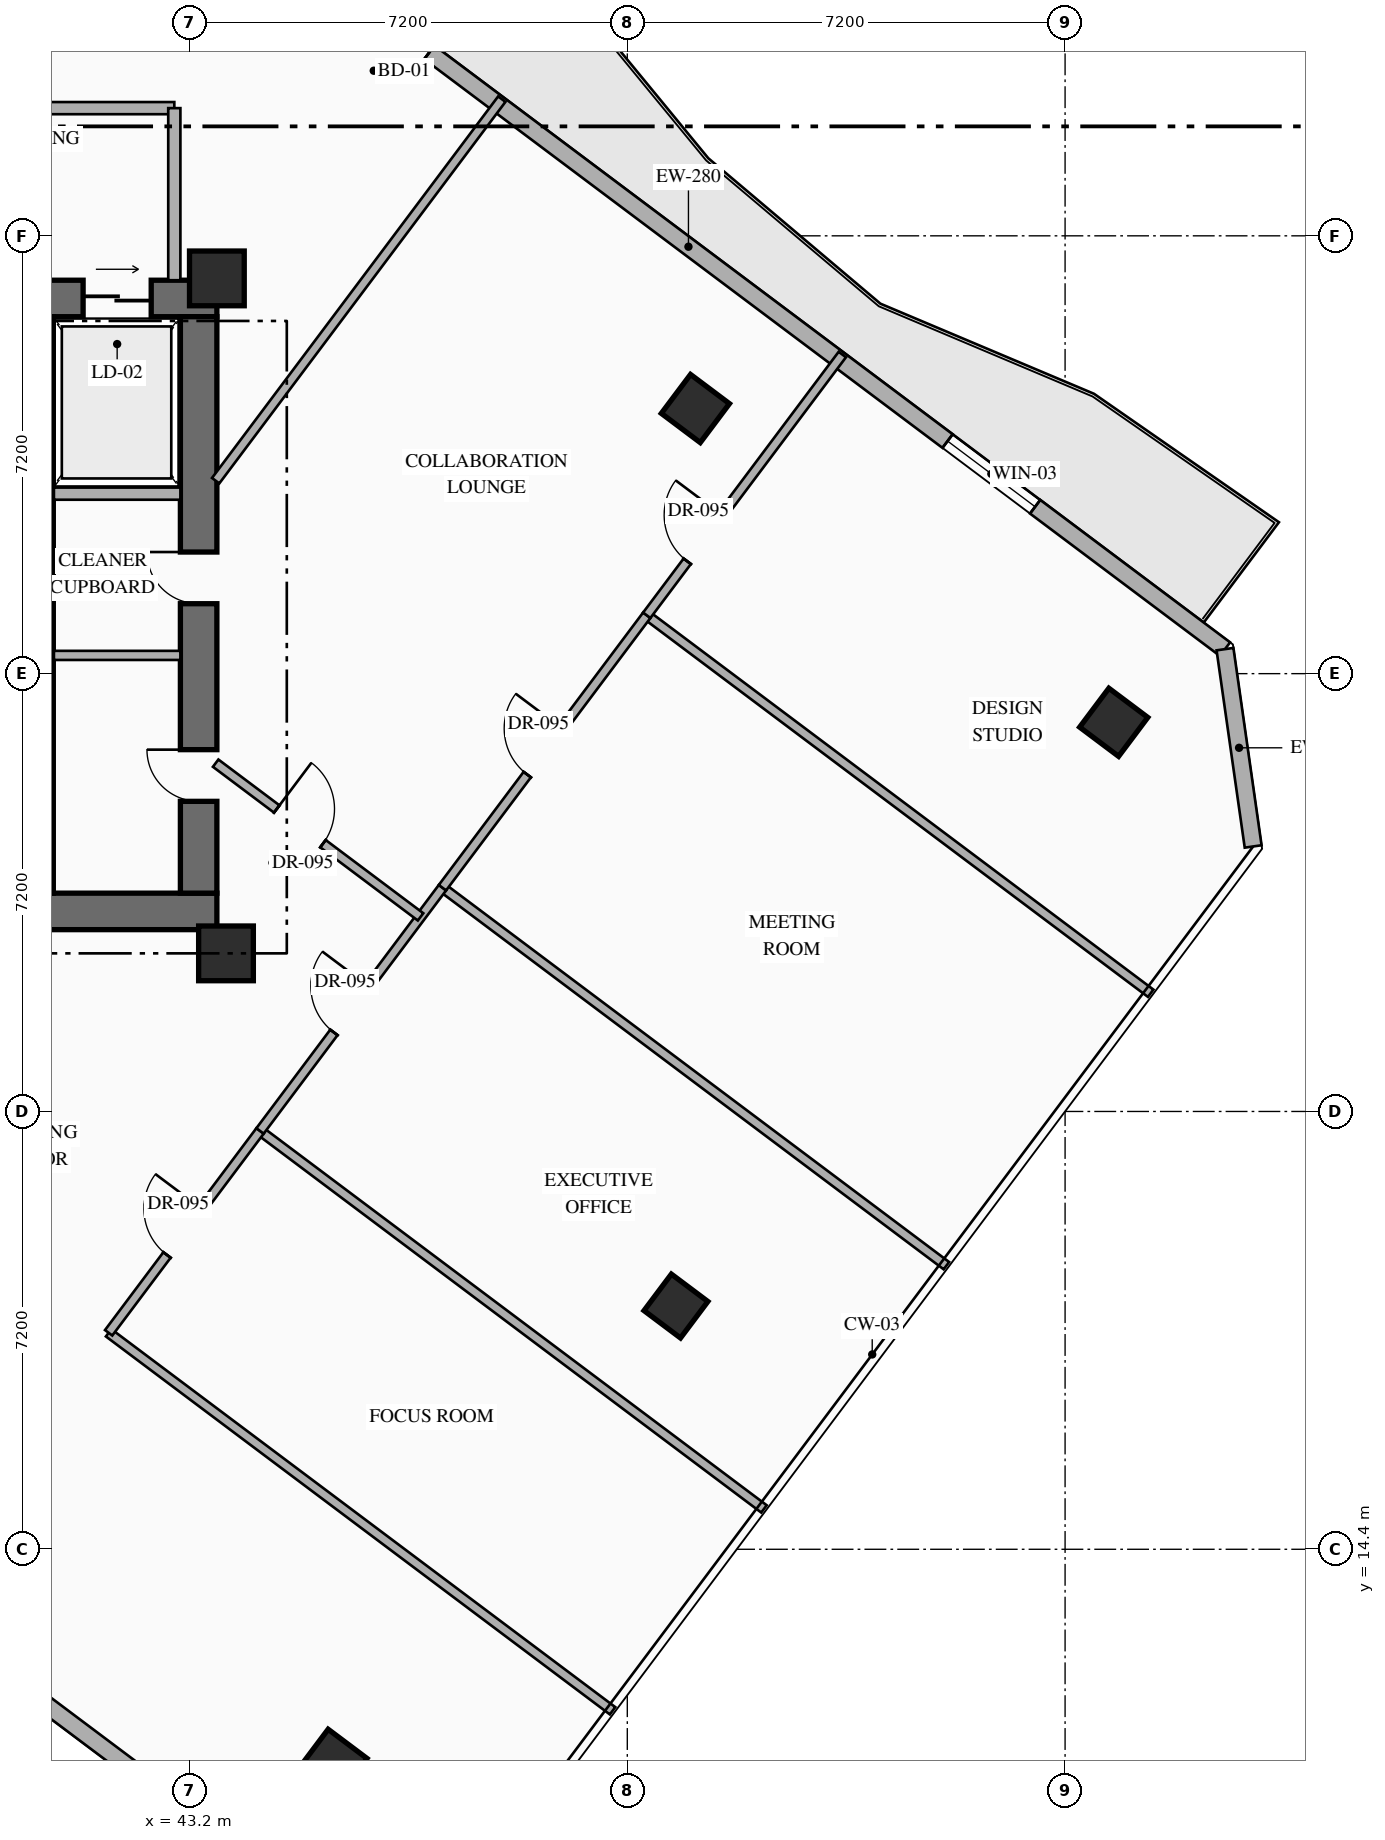
"""IFC4 building model, lengths in metres.
Left out: names, types, materials, properties, quantities, classifications, styles, units other than length and angle.
Written with IfcOpenShell. Run it as: python <this file> out.ifc"""

import sys

from ifc_helpers import new_model, si_unit, direction, frame, frame_2d, origin, origin_2d, place, context, subcontext, project, spatial, rectangle, hollow_rectangle, extrude, element, fill, save


model = new_model("IFC4")
c1 = context("Model", 3, precision=1e-05, world=origin(), true_north=direction((0.0, 1.0)))
c2 = subcontext(c1, "Body", "Model", "MODEL_VIEW")
j1 = project(units=[si_unit("LENGTHUNIT", "METRE"), si_unit("PLANEANGLEUNIT", "RADIAN")], contexts=[c1])
p1 = place(None, origin())
s1 = spatial("IfcSite", under=j1, at=p1, CompositionType="ELEMENT")
p2 = place(p1, origin())
s2 = spatial("IfcBuilding", under=s1, at=p2, CompositionType="ELEMENT")
p3 = place(p2, frame((0.0, 0.0, 163.65)))
s3 = spatial("IfcBuildingStorey", under=s2, at=p3, CompositionType="ELEMENT", Elevation=163.65)
p4 = place(p3, frame((35.89, 24.89, 0.0), z_axis=(0.0, 0.0, 1.0), x_axis=(1.0, 0.0, 0.0)))
e1 = element("IfcWall", 1, at=p4, inside=s3, PredefinedType="SHEAR", context=c2, shape_type="SweptSolid", body=[
    extrude(rectangle(XDim=7.76, YDim=0.6, at=frame_2d((3.88, 0.0))), origin(), (0.0, 0.0, 1.0), 3.6),
])
p5 = place(p3, frame((35.89, 34.97, 0.0), z_axis=(0.0, 0.0, 1.0), x_axis=(1.0, 0.0, 0.0)))
e2 = element("IfcWall", 2, at=p5, inside=s3, PredefinedType="SHEAR", context=c2, shape_type="SweptSolid", body=[
    extrude(rectangle(XDim=7.76, YDim=0.6, at=frame_2d((3.88, 0.0))), origin(), (0.0, 0.0, 1.0), 3.6),
])
p6 = place(p5, frame((2.66, 0.0, 0.0)))
e3 = element("IfcOpeningElement", 3, at=p6, cuts=e2, PredefinedType="OPENING", context=c2, shape_type="SweptSolid", body=[
    extrude(rectangle(XDim=1.1, YDim=2.2, at=frame_2d((0.55, 1.1))), frame((0.0, 0.31, 0.0), z_axis=(0.0, -1.0, 0.0), x_axis=(1.0, 0.0, 0.0)), (0.0, 0.0, 1.0), 0.62),
])
p7 = place(p5, frame((5.56, 0.0, 0.0)))
e4 = element("IfcOpeningElement", 4, at=p7, cuts=e2, PredefinedType="OPENING", context=c2, shape_type="SweptSolid", body=[
    extrude(rectangle(XDim=1.12, YDim=2.15, at=frame_2d((0.56, 1.075))), frame((0.0, 0.31, 0.0), z_axis=(0.0, -1.0, 0.0), x_axis=(1.0, 0.0, 0.0)), (0.0, 0.0, 1.0), 0.62),
])
p8 = place(p3, frame((43.35, 25.19, 0.0), z_axis=(0.0, 0.0, 1.0), x_axis=(0.0, 1.0, 0.0)))
e5 = element("IfcWall", 5, at=p8, inside=s3, PredefinedType="SHEAR", context=c2, shape_type="SweptSolid", body=[
    extrude(rectangle(XDim=9.48, YDim=0.6, at=frame_2d((4.74, 0.0))), origin(), (0.0, 0.0, 1.0), 3.6),
])
p9 = place(p8, frame((1.51, 0.0, 0.0)))
e6 = element("IfcOpeningElement", 6, at=p9, cuts=e5, PredefinedType="OPENING", context=c2, shape_type="SweptSolid", body=[
    extrude(rectangle(XDim=0.85, YDim=2.08, at=frame_2d((0.425, 1.04))), frame((0.0, 0.31, 0.0), z_axis=(0.0, -1.0, 0.0), x_axis=(1.0, 0.0, 0.0)), (0.0, 0.0, 1.0), 0.62),
])
p10 = place(p8, frame((4.76, 0.0, 0.0)))
e7 = element("IfcOpeningElement", 7, at=p10, cuts=e5, PredefinedType="OPENING", context=c2, shape_type="SweptSolid", body=[
    extrude(rectangle(XDim=0.85, YDim=2.08, at=frame_2d((0.425, 1.04))), frame((0.0, 0.31, 0.0), z_axis=(0.0, -1.0, 0.0), x_axis=(1.0, 0.0, 0.0)), (0.0, 0.0, 1.0), 0.62),
])
p11 = place(p3, frame((40.81, 25.19, 0.0), z_axis=(0.0, 0.0, 1.0), x_axis=(0.0, 1.0, 0.0)))
e8 = element("IfcWall", 8, at=p11, inside=s3, PredefinedType="SHEAR", context=c2, shape_type="SweptSolid", body=[
    extrude(rectangle(XDim=9.48, YDim=0.3, at=frame_2d((4.74, 0.0))), origin(), (0.0, 0.0, 1.0), 3.6),
])
for number, where, z_axis, x_axis in (
    (9, (43.8, 24.2, 0.0), (0.0, 0.0, 1.0), (1.0, 0.0, 0.0)),
    (10, (43.65, 35.3, 0.0), (0.0, 0.0, 1.0), (1.0, 0.0, 0.0)),
):
    element("IfcColumn", number, at=place(p3, frame(where, z_axis=z_axis, x_axis=x_axis)), inside=s3, PredefinedType="COLUMN", context=c2, shape_type="SweptSolid", body=[
        extrude(rectangle(XDim=0.9, YDim=0.9, at=origin_2d()), origin(), (0.0, 0.0, 1.0), 3.6),
    ])
for number, where, z_axis, x_axis in (
    (11, (51.52, 33.16, 0.0), (0.0, 0.0, 1.0), (0.8, -0.6, 0.0)),
    (12, (45.56, 10.88, 0.0), (0.0, 0.0, 1.0), (0.8, -0.6, 0.0)),
    (13, (58.4, 28.0, 0.0), (0.0, 0.0, 1.0), (0.8, -0.6, 0.0)),
):
    element("IfcColumn", number, at=place(p3, frame(where, z_axis=z_axis, x_axis=x_axis)), inside=s3, PredefinedType="COLUMN", context=c2, shape_type="SweptSolid", body=[
        extrude(hollow_rectangle(XDim=0.8, YDim=0.8, WallThickness=0.032, at=origin_2d()), origin(), (0.0, 0.0, 1.0), 3.6),
    ])
p12 = place(p3, frame((51.2, 18.4, 0.0), z_axis=(0.0, 0.0, 1.0), x_axis=(0.799999996291, -0.600000004945, 0.0)))
e14 = element("IfcColumn", 14, at=p12, inside=s3, PredefinedType="COLUMN", context=c2, shape_type="SweptSolid", body=[
    extrude(hollow_rectangle(XDim=0.75, YDim=0.75, WallThickness=0.028, at=origin_2d()), origin(), (0.0, 0.0, 1.0), 3.6),
])
p13 = place(p3, frame((44.86, 40.73, 0.0), z_axis=(0.0, 0.0, 1.0), x_axis=(0.800007624502, -0.599989833863, 0.0)))
e15 = element("IfcWall", 15, at=p13, inside=s3, PredefinedType="STANDARD", context=c2, shape_type="SweptSolid", body=[
    extrude(rectangle(XDim=19.212, YDim=0.28, at=frame_2d((9.606, 0.0))), origin(), (0.0, 0.0, 1.0), 3.35),
])
p14 = place(p13, frame((1.755, 0.0, 0.0)))
e16 = element("IfcOpeningElement", 16, at=p14, cuts=e15, PredefinedType="OPENING", context=c2, shape_type="SweptSolid", body=[
    extrude(rectangle(XDim=1.1, YDim=2.2, at=frame_2d((0.55, 1.1))), frame((0.0, 0.15, 0.0), z_axis=(0.0, -1.0, 0.0), x_axis=(1.0, 0.0, 0.0)), (0.0, 0.0, 1.0), 0.3),
])
p15 = place(p13, frame((13.509, 0.0, 0.85)))
e17 = element("IfcOpeningElement", 17, at=p15, cuts=e15, PredefinedType="OPENING", context=c2, shape_type="SweptSolid", body=[
    extrude(rectangle(XDim=1.8, YDim=2.1, at=frame_2d((0.9, 1.05))), frame((0.0, 0.15, 0.0), z_axis=(0.0, -1.0, 0.0), x_axis=(1.0, 0.0, 0.0)), (0.0, 0.0, 1.0), 0.3),
])
p16 = place(p3, frame((60.23, 29.203, 0.0), z_axis=(0.0, 0.0, 1.0), x_axis=(0.141296221922, -0.989967361922, 0.0)))
e18 = element("IfcWall", 18, at=p16, inside=s3, PredefinedType="STANDARD", context=c2, shape_type="SweptSolid", body=[
    extrude(rectangle(XDim=3.278, YDim=0.28, at=frame_2d((1.639, 0.0))), origin(), (0.0, 0.0, 1.0), 3.35),
])
p17 = place(p3, frame((44.918, 8.787, 0.0), z_axis=(0.0, 0.0, 1.0), x_axis=(-0.800004765927, 0.599993645378, 0.0)))
e19 = element("IfcWall", 19, at=p17, inside=s3, PredefinedType="STANDARD", context=c2, shape_type="SweptSolid", body=[
    extrude(rectangle(XDim=24.588, YDim=0.28, at=frame_2d((12.294, 0.0))), origin(), (0.0, 0.0, 1.0), 3.35),
])
p18 = place(p3, frame((40.97, 31.76, 0.0), z_axis=(0.0, 0.0, 1.0), x_axis=(1.0, 0.0, 0.0)))
e20 = element("IfcWall", 20, at=p18, inside=s3, PredefinedType="STANDARD", context=c2, shape_type="SweptSolid", body=[
    extrude(rectangle(XDim=2.08, YDim=0.2, at=frame_2d((1.04, 0.0))), origin(), (0.0, 0.0, 1.0), 3.35),
])
p19 = place(p3, frame((40.97, 29.1, 0.0), z_axis=(0.0, 0.0, 1.0), x_axis=(1.0, 0.0, 0.0)))
e21 = element("IfcWall", 21, at=p19, inside=s3, PredefinedType="PARTITIONING", context=c2, shape_type="SweptSolid", body=[
    extrude(rectangle(XDim=2.08, YDim=0.15, at=frame_2d((1.04, 0.0))), origin(), (0.0, 0.0, 1.0), 3.35),
])
p20 = place(p3, frame((37.65, 38.1, 0.0), z_axis=(0.0, 0.0, 1.0), x_axis=(1.0, 0.0, 0.0)))
e22 = element("IfcWall", 22, at=p20, inside=s3, PredefinedType="STANDARD", context=c2, shape_type="SweptSolid", body=[
    extrude(rectangle(XDim=5.3, YDim=0.2, at=frame_2d((2.65, 0.0))), origin(), (0.0, 0.0, 1.0), 3.35),
])
p21 = place(p3, frame((42.95, 35.27, 0.0), z_axis=(0.0, 0.0, 1.0), x_axis=(0.0, 1.0, 0.0)))
e23 = element("IfcWall", 23, at=p21, inside=s3, PredefinedType="STANDARD", context=c2, shape_type="SweptSolid", body=[
    extrude(rectangle(XDim=2.83, YDim=0.2, at=frame_2d((1.415, 0.0))), origin(), (0.0, 0.0, 1.0), 3.35),
])
for number, where, z_axis, x_axis in (
    (24, (41.87, 17.96, 0.0), (0.0, 0.0, 1.0), (0.8, -0.6, 0.0)),
    (25, (44.36, 21.28, 0.0), (0.0, 0.0, 1.0), (0.8, -0.6, 0.0)),
):
    element("IfcWall", number, at=place(p3, frame(where, z_axis=z_axis, x_axis=x_axis)), inside=s3, PredefinedType="PARTITIONING", context=c2, shape_type="SweptSolid", body=[
        extrude(rectangle(XDim=10.36, YDim=0.15, at=frame_2d((5.18, 0.0))), origin(), (0.0, 0.0, 1.0), 3.35),
    ])
p22 = place(p3, frame((41.87, 17.96, 0.0), z_axis=(0.0, 0.0, 1.0), x_axis=(0.599990587419, 0.80000705935, 0.0)))
e26 = element("IfcWall", 26, at=p22, inside=s3, PredefinedType="PARTITIONING", context=c2, shape_type="SweptSolid", body=[
    extrude(rectangle(XDim=4.15, YDim=0.15, at=frame_2d((2.075, 0.0))), origin(), (0.0, 0.0, 1.0), 3.35),
])
p23 = place(p22, frame((1.6, 0.0, 0.0)))
e27 = element("IfcOpeningElement", 27, at=p23, cuts=e26, PredefinedType="OPENING", context=c2, shape_type="SweptSolid", body=[
    extrude(rectangle(XDim=0.95, YDim=2.15, at=frame_2d((0.475, 1.075))), frame((0.0, 0.085, 0.0), z_axis=(0.0, -1.0, 0.0), x_axis=(1.0, 0.0, 0.0)), (0.0, 0.0, 1.0), 0.17),
])
p24 = place(p3, frame((47.36, 25.28, 0.0), z_axis=(0.0, 0.0, 1.0), x_axis=(0.799991516197, -0.600011311571, 0.0)))
e28 = element("IfcWall", 28, at=p24, inside=s3, PredefinedType="PARTITIONING", context=c2, shape_type="SweptSolid", body=[
    extrude(rectangle(XDim=10.36, YDim=0.15, at=frame_2d((5.18, 0.0))), origin(), (0.0, 0.0, 1.0), 3.35),
])
p25 = place(p3, frame((44.36, 21.28, 0.0), z_axis=(0.0, 0.0, 1.0), x_axis=(0.6, 0.8, 0.0)))
e29 = element("IfcWall", 29, at=p25, inside=s3, PredefinedType="PARTITIONING", context=c2, shape_type="SweptSolid", body=[
    extrude(rectangle(XDim=5.0, YDim=0.15, at=frame_2d((2.5, 0.0))), origin(), (0.0, 0.0, 1.0), 3.35),
])
p26 = place(p25, frame((2.025, 0.0, 0.0)))
e30 = element("IfcOpeningElement", 30, at=p26, cuts=e29, PredefinedType="OPENING", context=c2, shape_type="SweptSolid", body=[
    extrude(rectangle(XDim=0.95, YDim=2.15, at=frame_2d((0.475, 1.075))), frame((0.0, 0.085, 0.0), z_axis=(0.0, -1.0, 0.0), x_axis=(1.0, 0.0, 0.0)), (0.0, 0.0, 1.0), 0.17),
])
p27 = place(p3, frame((50.72, 29.76, 0.0), z_axis=(0.0, 0.0, 1.0), x_axis=(0.8, -0.6, 0.0)))
e31 = element("IfcWall", 31, at=p27, inside=s3, PredefinedType="PARTITIONING", context=c2, shape_type="SweptSolid", body=[
    extrude(rectangle(XDim=10.36, YDim=0.15, at=frame_2d((5.18, 0.0))), origin(), (0.0, 0.0, 1.0), 3.35),
])
p28 = place(p3, frame((47.36, 25.28, 0.0), z_axis=(0.0, 0.0, 1.0), x_axis=(0.599986048773, 0.80001046323, 0.0)))
e32 = element("IfcWall", 32, at=p28, inside=s3, PredefinedType="PARTITIONING", context=c2, shape_type="SweptSolid", body=[
    extrude(rectangle(XDim=5.6, YDim=0.15, at=frame_2d((2.8, 0.0))), origin(), (0.0, 0.0, 1.0), 3.35),
])
p29 = place(p28, frame((2.325, 0.0, 0.0)))
e33 = element("IfcOpeningElement", 33, at=p29, cuts=e32, PredefinedType="OPENING", context=c2, shape_type="SweptSolid", body=[
    extrude(rectangle(XDim=0.95, YDim=2.15, at=frame_2d((0.475, 1.075))), frame((0.0, 0.085, 0.0), z_axis=(0.0, -1.0, 0.0), x_axis=(1.0, 0.0, 0.0)), (0.0, 0.0, 1.0), 0.17),
])
p30 = place(p3, frame((50.72, 29.76, 0.0), z_axis=(0.0, 0.0, 1.0), x_axis=(0.6, 0.8, 0.0)))
e34 = element("IfcWall", 34, at=p30, inside=s3, PredefinedType="PARTITIONING", context=c2, shape_type="SweptSolid", body=[
    extrude(rectangle(XDim=5.36, YDim=0.15, at=frame_2d((2.68, 0.0))), origin(), (0.0, 0.0, 1.0), 3.35),
])
p31 = place(p30, frame((1.11, 0.0, 0.0)))
e35 = element("IfcOpeningElement", 35, at=p31, cuts=e34, PredefinedType="OPENING", context=c2, shape_type="SweptSolid", body=[
    extrude(rectangle(XDim=0.95, YDim=2.15, at=frame_2d((0.475, 1.075))), frame((0.0, 0.085, 0.0), z_axis=(0.0, -1.0, 0.0), x_axis=(1.0, 0.0, 0.0)), (0.0, 0.0, 1.0), 0.17),
])
p32 = place(p3, frame((43.63, 27.328, 0.0), z_axis=(0.0, 0.0, 1.0), x_axis=(0.799972182084, -0.600037088764, 0.0)))
e36 = element("IfcWall", 36, at=p32, inside=s3, PredefinedType="PARTITIONING", context=c2, shape_type="SweptSolid", body=[
    extrude(rectangle(XDim=4.213, YDim=0.15, at=frame_2d((2.106, 0.0))), origin(), (0.0, 0.0, 1.0), 3.045),
])
p33 = place(p32, frame((1.256, 0.0, 0.0)))
e37 = element("IfcOpeningElement", 37, at=p33, cuts=e36, PredefinedType="OPENING", context=c2, shape_type="SweptSolid", body=[
    extrude(rectangle(XDim=0.95, YDim=2.15, at=frame_2d((0.475, 1.075))), frame((0.0, 0.085, 0.0), z_axis=(0.0, -1.0, 0.0), x_axis=(1.0, 0.0, 0.0)), (0.0, 0.0, 1.0), 0.17),
])
p34 = place(p3, frame((43.63, 31.973, 0.0), z_axis=(0.0, 0.0, 1.0), x_axis=(0.599975099311, 0.800018674911, 0.0)))
e38 = element("IfcWall", 38, at=p34, inside=s3, PredefinedType="PARTITIONING", context=c2, shape_type="SweptSolid", body=[
    extrude(rectangle(XDim=7.844, YDim=0.15, at=frame_2d((3.922, 0.0))), origin(), (0.0, 0.0, 1.0), 3.35),
])
p35 = place(p14, origin())
e39 = element("IfcDoor", 39, at=p35, inside=s3, OperationType="SINGLE_SWING_LEFT", PredefinedType="DOOR", context=c2, shape_type="SweptSolid", body=[
    extrude(rectangle(XDim=1.1, YDim=2.2, at=frame_2d((0.55, 1.1))), frame((0.0, 0.025, 0.0), z_axis=(0.0, -1.0, 0.0), x_axis=(1.0, 0.0, 0.0)), (0.0, 0.0, 1.0), 0.05),
])
fill(e16, e39)
p36 = place(p15, origin())
e40 = element("IfcWindow", 40, at=p36, inside=s3, PartitioningType="SINGLE_PANEL", PredefinedType="WINDOW", context=c2, shape_type="SweptSolid", body=[
    extrude(rectangle(XDim=1.8, YDim=2.1, at=frame_2d((0.9, 1.05))), frame((0.0, 0.03, 0.0), z_axis=(0.0, -1.0, 0.0), x_axis=(1.0, 0.0, 0.0)), (0.0, 0.0, 1.0), 0.06),
])
fill(e17, e40)
p37 = place(p7, origin())
e41 = element("IfcDoor", 41, at=p37, inside=s3, OperationType="SLIDING_TO_RIGHT", PredefinedType="USERDEFINED", context=c2, shape_type="SweptSolid", body=[
    extrude(rectangle(XDim=1.12, YDim=2.15, at=frame_2d((0.56, 1.075))), frame((0.0, 0.025, 0.0), z_axis=(0.0, -1.0, 0.0), x_axis=(1.0, 0.0, 0.0)), (0.0, 0.0, 1.0), 0.05),
])
fill(e4, e41)
p38 = place(p9, origin())
e42 = element("IfcDoor", 42, at=p38, inside=s3, OperationType="SINGLE_SWING_RIGHT", PredefinedType="DOOR", context=c2, shape_type="SweptSolid", body=[
    extrude(rectangle(XDim=0.85, YDim=2.08, at=frame_2d((0.425, 1.04))), frame((0.0, 0.025, 0.0), z_axis=(0.0, -1.0, 0.0), x_axis=(1.0, 0.0, 0.0)), (0.0, 0.0, 1.0), 0.05),
])
fill(e6, e42)
p39 = place(p10, origin())
e43 = element("IfcDoor", 43, at=p39, inside=s3, OperationType="SINGLE_SWING_RIGHT", PredefinedType="DOOR", context=c2, shape_type="SweptSolid", body=[
    extrude(rectangle(XDim=0.85, YDim=2.08, at=frame_2d((0.425, 1.04))), frame((0.0, 0.025, 0.0), z_axis=(0.0, -1.0, 0.0), x_axis=(1.0, 0.0, 0.0)), (0.0, 0.0, 1.0), 0.05),
])
fill(e7, e43)
p40 = place(p23, origin())
e44 = element("IfcDoor", 44, at=p40, inside=s3, OperationType="SINGLE_SWING_RIGHT", PredefinedType="DOOR", context=c2, shape_type="SweptSolid", body=[
    extrude(rectangle(XDim=0.95, YDim=2.15, at=frame_2d((0.475, 1.075))), frame((0.0, 0.025, 0.0), z_axis=(0.0, -1.0, 0.0), x_axis=(1.0, 0.0, 0.0)), (0.0, 0.0, 1.0), 0.05),
])
fill(e27, e44)
p41 = place(p26, origin())
e45 = element("IfcDoor", 45, at=p41, inside=s3, OperationType="SINGLE_SWING_RIGHT", PredefinedType="DOOR", context=c2, shape_type="SweptSolid", body=[
    extrude(rectangle(XDim=0.95, YDim=2.15, at=frame_2d((0.475, 1.075))), frame((0.0, 0.025, 0.0), z_axis=(0.0, -1.0, 0.0), x_axis=(1.0, 0.0, 0.0)), (0.0, 0.0, 1.0), 0.05),
])
fill(e30, e45)
p42 = place(p29, origin())
e46 = element("IfcDoor", 46, at=p42, inside=s3, OperationType="SINGLE_SWING_RIGHT", PredefinedType="DOOR", context=c2, shape_type="SweptSolid", body=[
    extrude(rectangle(XDim=0.95, YDim=2.15, at=frame_2d((0.475, 1.075))), frame((0.0, 0.025, 0.0), z_axis=(0.0, -1.0, 0.0), x_axis=(1.0, 0.0, 0.0)), (0.0, 0.0, 1.0), 0.05),
])
fill(e33, e46)
p43 = place(p31, origin())
e47 = element("IfcDoor", 47, at=p43, inside=s3, OperationType="SINGLE_SWING_RIGHT", PredefinedType="DOOR", context=c2, shape_type="SweptSolid", body=[
    extrude(rectangle(XDim=0.95, YDim=2.15, at=frame_2d((0.475, 1.075))), frame((0.0, 0.025, 0.0), z_axis=(0.0, -1.0, 0.0), x_axis=(1.0, 0.0, 0.0)), (0.0, 0.0, 1.0), 0.05),
])
fill(e35, e47)
p44 = place(p33, origin())
e48 = element("IfcDoor", 48, at=p44, inside=s3, OperationType="SINGLE_SWING_LEFT", PredefinedType="DOOR", context=c2, shape_type="SweptSolid", body=[
    extrude(rectangle(XDim=0.95, YDim=2.15, at=frame_2d((0.475, 1.075))), frame((0.0, 0.025, 0.0), z_axis=(0.0, -1.0, 0.0), x_axis=(1.0, 0.0, 0.0)), (0.0, 0.0, 1.0), 0.05),
])
fill(e37, e48)
save(model, sys.argv[1])
